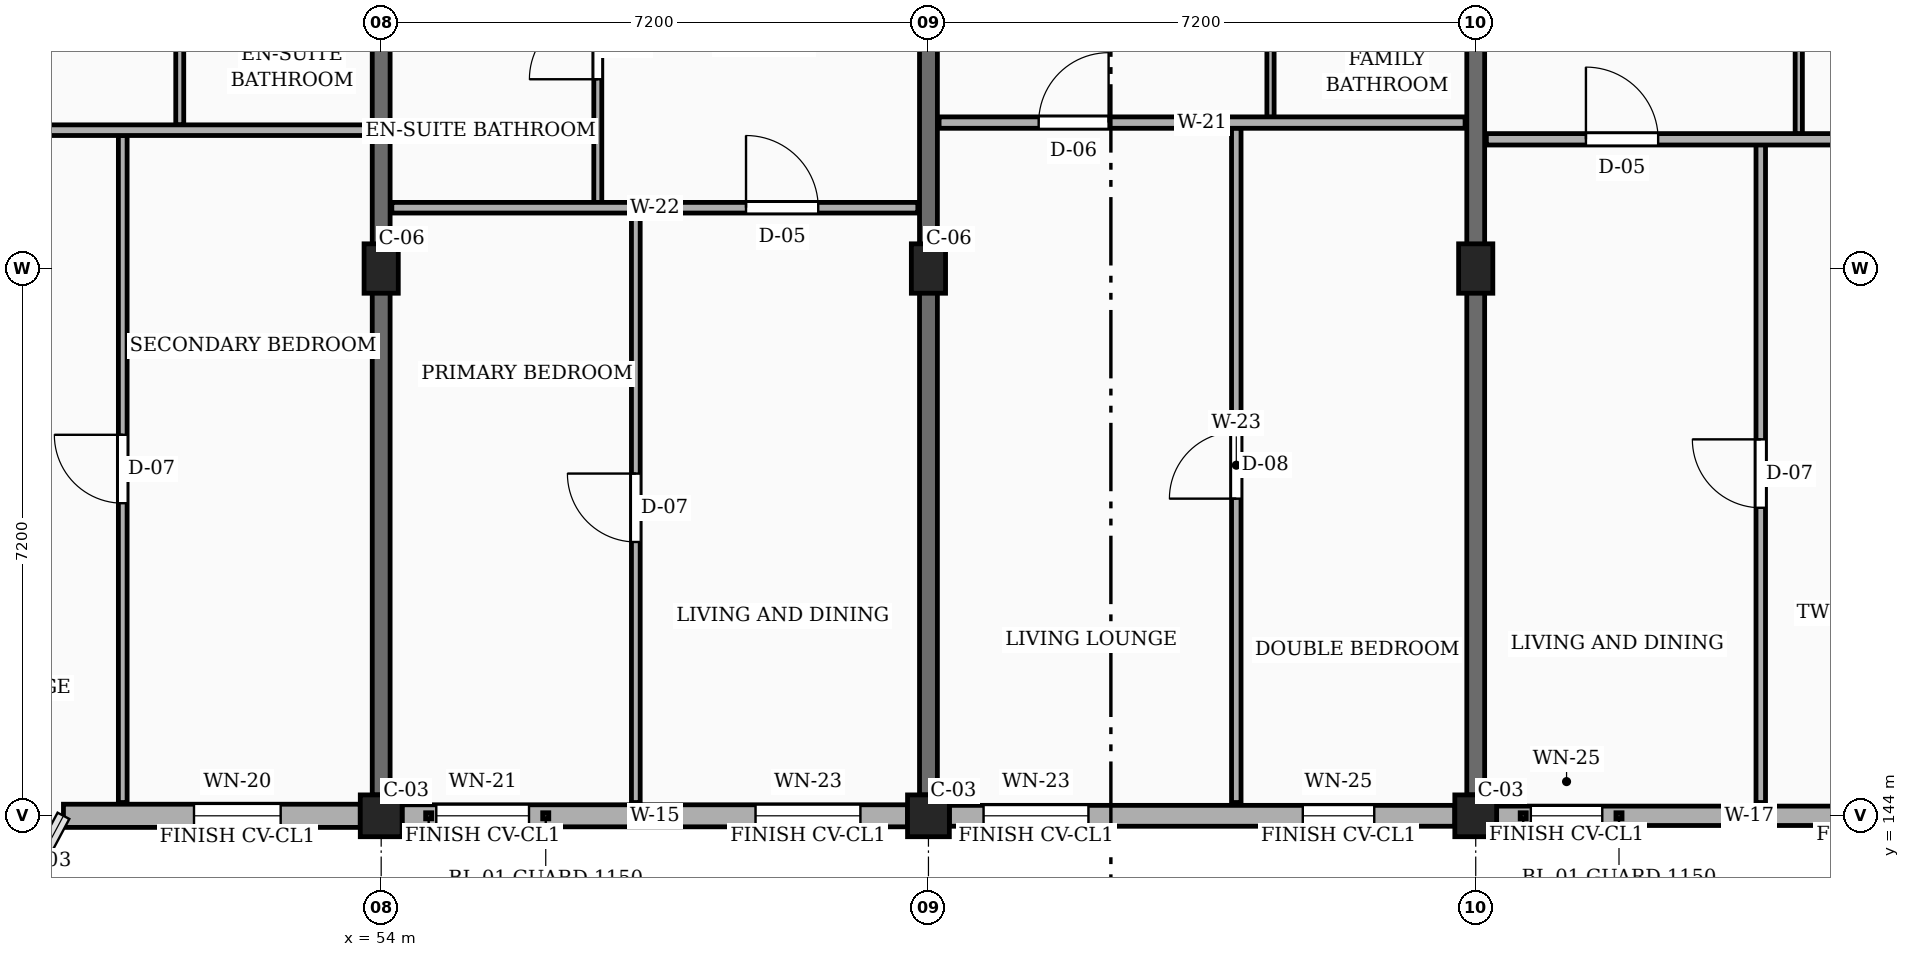
"""IFC4 building model, lengths in metres.
Left out: names, types, materials, properties, quantities, classifications, styles, units other than length and angle.
Written with IfcOpenShell. Run it as: python <this file> out.ifc"""

import sys

from ifc_helpers import new_model, si_unit, direction, frame, frame_2d, origin, origin_2d, place, context, subcontext, project, spatial, rectangle, extrude, element, fill, save


model = new_model("IFC4")
c1 = context("Model", 3, precision=1e-05, world=origin(), true_north=direction((0.0, 1.0)))
c2 = subcontext(c1, "Body", "Model", "MODEL_VIEW")
j1 = project(units=[si_unit("LENGTHUNIT", "METRE"), si_unit("PLANEANGLEUNIT", "RADIAN")], contexts=[c1])
p1 = place(None, origin())
s1 = spatial("IfcSite", under=j1, at=p1, CompositionType="ELEMENT")
p2 = place(p1, origin())
s2 = spatial("IfcBuilding", under=s1, at=p2, CompositionType="ELEMENT")
p3 = place(p2, frame((0.0, 0.0, 13.95)))
s3 = spatial("IfcBuildingStorey", under=s2, at=p3, CompositionType="ELEMENT", Elevation=13.95)
p4 = place(p3, frame((54.0, 144.0, 0.0), z_axis=(0.0, 0.0, 1.0), x_axis=(1.0, 0.0, 0.0)))
e1 = element("IfcColumn", 1, at=p4, inside=s3, PredefinedType="COLUMN", context=c2, shape_type="SweptSolid", body=[
    extrude(rectangle(XDim=0.55, YDim=0.55, at=origin_2d()), origin(), (0.0, 0.0, 1.0), 3.15),
])
p5 = place(p3, frame((54.0, 151.2, 0.0), z_axis=(0.0, 0.0, 1.0), x_axis=(1.0, 0.0, 0.0)))
e2 = element("IfcColumn", 2, at=p5, inside=s3, PredefinedType="COLUMN", context=c2, shape_type="SweptSolid", body=[
    extrude(rectangle(XDim=0.45, YDim=0.65, at=origin_2d()), origin(), (0.0, 0.0, 1.0), 3.15),
])
p6 = place(p3, frame((61.2, 144.0, 0.0), z_axis=(0.0, 0.0, 1.0), x_axis=(1.0, 0.0, 0.0)))
e3 = element("IfcColumn", 3, at=p6, inside=s3, PredefinedType="COLUMN", context=c2, shape_type="SweptSolid", body=[
    extrude(rectangle(XDim=0.55, YDim=0.55, at=origin_2d()), origin(), (0.0, 0.0, 1.0), 3.15),
])
p7 = place(p3, frame((61.2, 151.2, 0.0), z_axis=(0.0, 0.0, 1.0), x_axis=(1.0, 0.0, 0.0)))
e4 = element("IfcColumn", 4, at=p7, inside=s3, PredefinedType="COLUMN", context=c2, shape_type="SweptSolid", body=[
    extrude(rectangle(XDim=0.45, YDim=0.65, at=origin_2d()), origin(), (0.0, 0.0, 1.0), 3.15),
])
p8 = place(p3, frame((68.4, 144.0, 0.0), z_axis=(0.0, 0.0, 1.0), x_axis=(1.0, 0.0, 0.0)))
e5 = element("IfcColumn", 5, at=p8, inside=s3, PredefinedType="COLUMN", context=c2, shape_type="SweptSolid", body=[
    extrude(rectangle(XDim=0.55, YDim=0.55, at=origin_2d()), origin(), (0.0, 0.0, 1.0), 3.15),
])
p9 = place(p3, frame((68.4, 151.2, 0.0), z_axis=(0.0, 0.0, 1.0), x_axis=(1.0, 0.0, 0.0)))
e6 = element("IfcColumn", 6, at=p9, inside=s3, PredefinedType="COLUMN", context=c2, shape_type="SweptSolid", body=[
    extrude(rectangle(XDim=0.45, YDim=0.65, at=origin_2d()), origin(), (0.0, 0.0, 1.0), 3.15),
])
for number, where, z_axis, x_axis in (
    (7, (54.0, 144.275, 0.0), (0.0, 0.0, 1.0), (0.0, 1.0, 0.0)),
    (8, (61.2, 144.275, 0.0), (0.0, 0.0, 1.0), (0.0, 1.0, 0.0)),
    (9, (68.4, 144.275, 0.0), (0.0, 0.0, 1.0), (0.0, 1.0, 0.0)),
):
    element("IfcWall", number, at=place(p3, frame(where, z_axis=z_axis, x_axis=x_axis)), inside=s3, PredefinedType="SOLIDWALL", context=c2, shape_type="SweptSolid", body=[
        extrude(rectangle(XDim=11.875, YDim=0.235, at=frame_2d((5.938, 0.0))), origin(), (0.0, 0.0, 1.0), 2.185),
    ])
p10 = place(p3, frame((49.82, 144.0, 0.0), z_axis=(0.0, 0.0, 1.0), x_axis=(1.0, 0.0, 0.0)))
e10 = element("IfcWall", 10, at=p10, inside=s3, PredefinedType="SOLIDWALL", context=c2, shape_type="SweptSolid", body=[
    extrude(rectangle(XDim=3.905, YDim=0.305, at=frame_2d((1.953, 0.0))), origin(), (0.0, 0.0, 1.0), 2.455),
])
p11 = place(p10, frame((1.718, 0.0, 0.78)))
e11 = element("IfcOpeningElement", 11, at=p11, cuts=e10, PredefinedType="OPENING", context=c2, shape_type="SweptSolid", body=[
    extrude(rectangle(XDim=1.14, YDim=1.36, at=frame_2d((0.57, 0.68))), frame((0.0, 0.163, 0.0), z_axis=(0.0, -1.0, 0.0), x_axis=(1.0, 0.0, 0.0)), (0.0, 0.0, 1.0), 0.325),
])
p12 = place(p3, frame((54.275, 144.0, 0.0), z_axis=(0.0, 0.0, 1.0), x_axis=(1.0, 0.0, 0.0)))
e12 = element("IfcWall", 12, at=p12, inside=s3, PredefinedType="SOLIDWALL", context=c2, shape_type="SweptSolid", body=[
    extrude(rectangle(XDim=6.65, YDim=0.29, at=frame_2d((3.325, 0.0))), origin(), (0.0, 0.0, 1.0), 2.455),
])
p13 = place(p12, frame((0.45, 0.0, 0.78)))
e13 = element("IfcOpeningElement", 13, at=p13, cuts=e12, PredefinedType="OPENING", context=c2, shape_type="SweptSolid", body=[
    extrude(rectangle(XDim=1.22, YDim=1.36, at=frame_2d((0.61, 0.68))), frame((0.0, 0.155, 0.0), z_axis=(0.0, -1.0, 0.0), x_axis=(1.0, 0.0, 0.0)), (0.0, 0.0, 1.0), 0.31),
])
p14 = place(p12, frame((4.65, 0.0, 0.78)))
e14 = element("IfcOpeningElement", 14, at=p14, cuts=e12, PredefinedType="OPENING", context=c2, shape_type="SweptSolid", body=[
    extrude(rectangle(XDim=1.38, YDim=1.36, at=frame_2d((0.69, 0.68))), frame((0.0, 0.155, 0.0), z_axis=(0.0, -1.0, 0.0), x_axis=(1.0, 0.0, 0.0)), (0.0, 0.0, 1.0), 0.31),
])
p15 = place(p3, frame((61.475, 144.0, 0.0), z_axis=(0.0, 0.0, 1.0), x_axis=(1.0, 0.0, 0.0)))
e15 = element("IfcWall", 15, at=p15, inside=s3, PredefinedType="SOLIDWALL", context=c2, shape_type="SweptSolid", body=[
    extrude(rectangle(XDim=6.65, YDim=0.275, at=frame_2d((3.325, 0.0))), origin(), (0.0, 0.0, 1.0), 2.455),
])
p16 = place(p15, frame((0.45, 0.0, 0.78)))
e16 = element("IfcOpeningElement", 16, at=p16, cuts=e15, PredefinedType="OPENING", context=c2, shape_type="SweptSolid", body=[
    extrude(rectangle(XDim=1.38, YDim=1.36, at=frame_2d((0.69, 0.68))), frame((0.0, 0.147, 0.0), z_axis=(0.0, -1.0, 0.0), x_axis=(1.0, 0.0, 0.0)), (0.0, 0.0, 1.0), 0.295),
])
p17 = place(p15, frame((4.65, 0.0, 0.78)))
e17 = element("IfcOpeningElement", 17, at=p17, cuts=e15, PredefinedType="OPENING", context=c2, shape_type="SweptSolid", body=[
    extrude(rectangle(XDim=0.94, YDim=1.44, at=frame_2d((0.47, 0.72))), frame((0.0, 0.147, 0.0), z_axis=(0.0, -1.0, 0.0), x_axis=(1.0, 0.0, 0.0)), (0.0, 0.0, 1.0), 0.295),
])
p18 = place(p3, frame((68.675, 144.0, 0.0), z_axis=(0.0, 0.0, 1.0), x_axis=(1.0, 0.0, 0.0)))
e18 = element("IfcWall", 18, at=p18, inside=s3, PredefinedType="SOLIDWALL", context=c2, shape_type="SweptSolid", body=[
    extrude(rectangle(XDim=6.65, YDim=0.255, at=frame_2d((3.325, 0.0))), origin(), (0.0, 0.0, 1.0), 2.455),
])
p19 = place(p18, frame((0.45, 0.0, 0.78)))
e19 = element("IfcOpeningElement", 19, at=p19, cuts=e18, PredefinedType="OPENING", context=c2, shape_type="SweptSolid", body=[
    extrude(rectangle(XDim=0.94, YDim=1.44, at=frame_2d((0.47, 0.72))), frame((0.0, 0.137, 0.0), z_axis=(0.0, -1.0, 0.0), x_axis=(1.0, 0.0, 0.0)), (0.0, 0.0, 1.0), 0.275),
])
p20 = place(p18, frame((4.65, 0.0, 0.78)))
e20 = element("IfcOpeningElement", 20, at=p20, cuts=e18, PredefinedType="OPENING", context=c2, shape_type="SweptSolid", body=[
    extrude(rectangle(XDim=1.15, YDim=1.44, at=frame_2d((0.575, 0.72))), frame((0.0, 0.137, 0.0), z_axis=(0.0, -1.0, 0.0), x_axis=(1.0, 0.0, 0.0)), (0.0, 0.0, 1.0), 0.275),
])
p21 = place(p3, frame((50.6, 144.175, 0.0), z_axis=(0.0, 0.0, 1.0), x_axis=(0.0, 1.0, 0.0)))
e21 = element("IfcWall", 21, at=p21, inside=s3, PredefinedType="PARTITIONING", context=c2, shape_type="SweptSolid", body=[
    extrude(rectangle(XDim=8.775, YDim=0.115, at=frame_2d((4.387, 0.0))), origin(), (0.0, 0.0, 1.0), 2.32),
])
p22 = place(p21, frame((3.938, 0.0, 0.0)))
e22 = element("IfcOpeningElement", 22, at=p22, cuts=e21, PredefinedType="OPENING", context=c2, shape_type="SweptSolid", body=[
    extrude(rectangle(XDim=0.9, YDim=2.1, at=frame_2d((0.45, 1.05))), frame((0.0, 0.067, 0.0), z_axis=(0.0, -1.0, 0.0), x_axis=(1.0, 0.0, 0.0)), (0.0, 0.0, 1.0), 0.135),
])
p23 = place(p3, frame((51.35, 153.09, 0.0), z_axis=(0.0, 0.0, 1.0), x_axis=(0.0, 1.0, 0.0)))
e23 = element("IfcWall", 23, at=p23, inside=s3, PredefinedType="PARTITIONING", context=c2, shape_type="SweptSolid", body=[
    extrude(rectangle(XDim=3.12, YDim=0.105, at=frame_2d((1.56, 0.0))), origin(), (0.0, 0.0, 1.0), 2.32),
])
p24 = place(p23, frame((1.11, 0.0, 0.0)))
e24 = element("IfcOpeningElement", 24, at=p24, cuts=e23, PredefinedType="OPENING", context=c2, shape_type="SweptSolid", body=[
    extrude(rectangle(XDim=0.9, YDim=2.05, at=frame_2d((0.45, 1.025))), frame((0.0, 0.062, 0.0), z_axis=(0.0, -1.0, 0.0), x_axis=(1.0, 0.0, 0.0)), (0.0, 0.0, 1.0), 0.125),
])
p25 = place(p3, frame((46.94, 153.02, 0.0), z_axis=(0.0, 0.0, 1.0), x_axis=(1.0, 0.0, 0.0)))
e25 = element("IfcWall", 25, at=p25, inside=s3, PredefinedType="PARTITIONING", context=c2, shape_type="SweptSolid", body=[
    extrude(rectangle(XDim=6.92, YDim=0.14, at=frame_2d((3.46, 0.0))), origin(), (0.0, 0.0, 1.0), 2.32),
])
p26 = place(p25, frame((1.31, 0.0, 0.0)))
e26 = element("IfcOpeningElement", 26, at=p26, cuts=e25, PredefinedType="OPENING", context=c2, shape_type="SweptSolid", body=[
    extrude(rectangle(XDim=0.95, YDim=2.1, at=frame_2d((0.475, 1.05))), frame((0.0, 0.08, 0.0), z_axis=(0.0, -1.0, 0.0), x_axis=(1.0, 0.0, 0.0)), (0.0, 0.0, 1.0), 0.16),
])
p27 = place(p3, frame((57.35, 144.175, 0.0), z_axis=(0.0, 0.0, 1.0), x_axis=(0.0, 1.0, 0.0)))
e27 = element("IfcWall", 27, at=p27, inside=s3, PredefinedType="PARTITIONING", context=c2, shape_type="SweptSolid", body=[
    extrude(rectangle(XDim=7.755, YDim=0.115, at=frame_2d((3.877, 0.0))), origin(), (0.0, 0.0, 1.0), 2.32),
])
p28 = place(p27, frame((3.427, 0.0, 0.0)))
e28 = element("IfcOpeningElement", 28, at=p28, cuts=e27, PredefinedType="OPENING", context=c2, shape_type="SweptSolid", body=[
    extrude(rectangle(XDim=0.9, YDim=2.1, at=frame_2d((0.45, 1.05))), frame((0.0, 0.067, 0.0), z_axis=(0.0, -1.0, 0.0), x_axis=(1.0, 0.0, 0.0)), (0.0, 0.0, 1.0), 0.135),
])
p29 = place(p3, frame((56.85, 152.07, 0.0), z_axis=(0.0, 0.0, 1.0), x_axis=(0.0, 1.0, 0.0)))
e29 = element("IfcWall", 29, at=p29, inside=s3, PredefinedType="PARTITIONING", context=c2, shape_type="SweptSolid", body=[
    extrude(rectangle(XDim=4.14, YDim=0.105, at=frame_2d((2.07, 0.0))), origin(), (0.0, 0.0, 1.0), 2.32),
])
p30 = place(p29, frame((1.62, 0.0, 0.0)))
e30 = element("IfcOpeningElement", 30, at=p30, cuts=e29, PredefinedType="OPENING", context=c2, shape_type="SweptSolid", body=[
    extrude(rectangle(XDim=0.9, YDim=2.05, at=frame_2d((0.45, 1.025))), frame((0.0, 0.062, 0.0), z_axis=(0.0, -1.0, 0.0), x_axis=(1.0, 0.0, 0.0)), (0.0, 0.0, 1.0), 0.125),
])
p31 = place(p3, frame((54.14, 152.0, 0.0), z_axis=(0.0, 0.0, 1.0), x_axis=(1.0, 0.0, 0.0)))
e31 = element("IfcWall", 31, at=p31, inside=s3, PredefinedType="PARTITIONING", context=c2, shape_type="SweptSolid", body=[
    extrude(rectangle(XDim=6.92, YDim=0.14, at=frame_2d((3.46, 0.0))), origin(), (0.0, 0.0, 1.0), 2.32),
])
p32 = place(p31, frame((4.66, 0.0, 0.0)))
e32 = element("IfcOpeningElement", 32, at=p32, cuts=e31, PredefinedType="OPENING", context=c2, shape_type="SweptSolid", body=[
    extrude(rectangle(XDim=0.95, YDim=2.1, at=frame_2d((0.475, 1.05))), frame((0.0, 0.08, 0.0), z_axis=(0.0, -1.0, 0.0), x_axis=(1.0, 0.0, 0.0)), (0.0, 0.0, 1.0), 0.16),
])
p33 = place(p3, frame((65.25, 144.175, 0.0), z_axis=(0.0, 0.0, 1.0), x_axis=(0.0, 1.0, 0.0)))
e33 = element("IfcWall", 33, at=p33, inside=s3, PredefinedType="PARTITIONING", context=c2, shape_type="SweptSolid", body=[
    extrude(rectangle(XDim=8.875, YDim=0.125, at=frame_2d((4.438, 0.0))), origin(), (0.0, 0.0, 1.0), 2.32),
])
p34 = place(p33, frame((3.998, 0.0, 0.0)))
e34 = element("IfcOpeningElement", 34, at=p34, cuts=e33, PredefinedType="OPENING", context=c2, shape_type="SweptSolid", body=[
    extrude(rectangle(XDim=0.88, YDim=2.08, at=frame_2d((0.44, 1.04))), frame((0.0, 0.073, 0.0), z_axis=(0.0, -1.0, 0.0), x_axis=(1.0, 0.0, 0.0)), (0.0, 0.0, 1.0), 0.145),
])
p35 = place(p3, frame((65.7, 153.19, 0.0), z_axis=(0.0, 0.0, 1.0), x_axis=(0.0, 1.0, 0.0)))
e35 = element("IfcWall", 35, at=p35, inside=s3, PredefinedType="PARTITIONING", context=c2, shape_type="SweptSolid", body=[
    extrude(rectangle(XDim=3.02, YDim=0.095, at=frame_2d((1.51, 0.0))), origin(), (0.0, 0.0, 1.0), 2.32),
])
p36 = place(p35, frame((1.075, 0.0, 0.0)))
e36 = element("IfcOpeningElement", 36, at=p36, cuts=e35, PredefinedType="OPENING", context=c2, shape_type="SweptSolid", body=[
    extrude(rectangle(XDim=0.87, YDim=2.05, at=frame_2d((0.435, 1.025))), frame((0.0, 0.058, 0.0), z_axis=(0.0, -1.0, 0.0), x_axis=(1.0, 0.0, 0.0)), (0.0, 0.0, 1.0), 0.115),
])
p37 = place(p3, frame((61.34, 153.12, 0.0), z_axis=(0.0, 0.0, 1.0), x_axis=(1.0, 0.0, 0.0)))
e37 = element("IfcWall", 37, at=p37, inside=s3, PredefinedType="PARTITIONING", context=c2, shape_type="SweptSolid", body=[
    extrude(rectangle(XDim=6.92, YDim=0.15, at=frame_2d((3.46, 0.0))), origin(), (0.0, 0.0, 1.0), 2.32),
])
p38 = place(p37, frame((1.31, 0.0, 0.0)))
e38 = element("IfcOpeningElement", 38, at=p38, cuts=e37, PredefinedType="OPENING", context=c2, shape_type="SweptSolid", body=[
    extrude(rectangle(XDim=0.92, YDim=2.1, at=frame_2d((0.46, 1.05))), frame((0.0, 0.085, 0.0), z_axis=(0.0, -1.0, 0.0), x_axis=(1.0, 0.0, 0.0)), (0.0, 0.0, 1.0), 0.17),
])
p39 = place(p3, frame((72.15, 144.175, 0.0), z_axis=(0.0, 0.0, 1.0), x_axis=(0.0, 1.0, 0.0)))
e39 = element("IfcWall", 39, at=p39, inside=s3, PredefinedType="PARTITIONING", context=c2, shape_type="SweptSolid", body=[
    extrude(rectangle(XDim=8.655, YDim=0.125, at=frame_2d((4.328, 0.0))), origin(), (0.0, 0.0, 1.0), 2.32),
])
p40 = place(p39, frame((3.877, 0.0, 0.0)))
e40 = element("IfcOpeningElement", 40, at=p40, cuts=e39, PredefinedType="OPENING", context=c2, shape_type="SweptSolid", body=[
    extrude(rectangle(XDim=0.9, YDim=2.1, at=frame_2d((0.45, 1.05))), frame((0.0, 0.073, 0.0), z_axis=(0.0, -1.0, 0.0), x_axis=(1.0, 0.0, 0.0)), (0.0, 0.0, 1.0), 0.145),
])
p41 = place(p3, frame((72.65, 152.97, 0.0), z_axis=(0.0, 0.0, 1.0), x_axis=(0.0, 1.0, 0.0)))
e41 = element("IfcWall", 41, at=p41, inside=s3, PredefinedType="PARTITIONING", context=c2, shape_type="SweptSolid", body=[
    extrude(rectangle(XDim=3.24, YDim=0.095, at=frame_2d((1.62, 0.0))), origin(), (0.0, 0.0, 1.0), 2.32),
])
p42 = place(p41, frame((1.17, 0.0, 0.0)))
e42 = element("IfcOpeningElement", 42, at=p42, cuts=e41, PredefinedType="OPENING", context=c2, shape_type="SweptSolid", body=[
    extrude(rectangle(XDim=0.9, YDim=2.05, at=frame_2d((0.45, 1.025))), frame((0.0, 0.058, 0.0), z_axis=(0.0, -1.0, 0.0), x_axis=(1.0, 0.0, 0.0)), (0.0, 0.0, 1.0), 0.115),
])
p43 = place(p3, frame((68.54, 152.9, 0.0), z_axis=(0.0, 0.0, 1.0), x_axis=(1.0, 0.0, 0.0)))
e43 = element("IfcWall", 43, at=p43, inside=s3, PredefinedType="PARTITIONING", context=c2, shape_type="SweptSolid", body=[
    extrude(rectangle(XDim=6.885, YDim=0.15, at=frame_2d((3.442, 0.0))), origin(), (0.0, 0.0, 1.0), 2.32),
])
p44 = place(p43, frame((1.31, 0.0, 0.0)))
e44 = element("IfcOpeningElement", 44, at=p44, cuts=e43, PredefinedType="OPENING", context=c2, shape_type="SweptSolid", body=[
    extrude(rectangle(XDim=0.95, YDim=2.1, at=frame_2d((0.475, 1.05))), frame((0.0, 0.085, 0.0), z_axis=(0.0, -1.0, 0.0), x_axis=(1.0, 0.0, 0.0)), (0.0, 0.0, 1.0), 0.17),
])
p45 = place(p11, origin())
e45 = element("IfcWindow", 45, at=p45, inside=s3, PartitioningType="SINGLE_PANEL", PredefinedType="WINDOW", context=c2, shape_type="SweptSolid", body=[
    extrude(rectangle(XDim=1.14, YDim=1.36, at=frame_2d((0.57, 0.68))), frame((0.0, 0.03, 0.0), z_axis=(0.0, -1.0, 0.0), x_axis=(1.0, 0.0, 0.0)), (0.0, 0.0, 1.0), 0.06),
])
fill(e11, e45)
p46 = place(p13, origin())
e46 = element("IfcWindow", 46, at=p46, inside=s3, PartitioningType="SINGLE_PANEL", PredefinedType="WINDOW", context=c2, shape_type="SweptSolid", body=[
    extrude(rectangle(XDim=1.22, YDim=1.36, at=frame_2d((0.61, 0.68))), frame((0.0, 0.03, 0.0), z_axis=(0.0, -1.0, 0.0), x_axis=(1.0, 0.0, 0.0)), (0.0, 0.0, 1.0), 0.06),
])
fill(e13, e46)
p47 = place(p14, origin())
e47 = element("IfcWindow", 47, at=p47, inside=s3, PartitioningType="SINGLE_PANEL", PredefinedType="WINDOW", context=c2, shape_type="SweptSolid", body=[
    extrude(rectangle(XDim=1.38, YDim=1.36, at=frame_2d((0.69, 0.68))), frame((0.0, 0.03, 0.0), z_axis=(0.0, -1.0, 0.0), x_axis=(1.0, 0.0, 0.0)), (0.0, 0.0, 1.0), 0.06),
])
fill(e14, e47)
p48 = place(p16, origin())
e48 = element("IfcWindow", 48, at=p48, inside=s3, PartitioningType="SINGLE_PANEL", PredefinedType="WINDOW", context=c2, shape_type="SweptSolid", body=[
    extrude(rectangle(XDim=1.38, YDim=1.36, at=frame_2d((0.69, 0.68))), frame((0.0, 0.03, 0.0), z_axis=(0.0, -1.0, 0.0), x_axis=(1.0, 0.0, 0.0)), (0.0, 0.0, 1.0), 0.06),
])
fill(e16, e48)
p49 = place(p17, origin())
e49 = element("IfcWindow", 49, at=p49, inside=s3, PartitioningType="SINGLE_PANEL", PredefinedType="WINDOW", context=c2, shape_type="SweptSolid", body=[
    extrude(rectangle(XDim=0.94, YDim=1.44, at=frame_2d((0.47, 0.72))), frame((0.0, 0.03, 0.0), z_axis=(0.0, -1.0, 0.0), x_axis=(1.0, 0.0, 0.0)), (0.0, 0.0, 1.0), 0.06),
])
fill(e17, e49)
p50 = place(p19, origin())
e50 = element("IfcWindow", 50, at=p50, inside=s3, PartitioningType="SINGLE_PANEL", PredefinedType="WINDOW", context=c2, shape_type="SweptSolid", body=[
    extrude(rectangle(XDim=0.94, YDim=1.44, at=frame_2d((0.47, 0.72))), frame((0.0, 0.03, 0.0), z_axis=(0.0, -1.0, 0.0), x_axis=(1.0, 0.0, 0.0)), (0.0, 0.0, 1.0), 0.06),
])
fill(e19, e50)
p51 = place(p22, origin())
e51 = element("IfcDoor", 51, at=p51, inside=s3, OperationType="SINGLE_SWING_RIGHT", PredefinedType="DOOR", context=c2, shape_type="SweptSolid", body=[
    extrude(rectangle(XDim=0.9, YDim=2.1, at=frame_2d((0.45, 1.05))), frame((0.0, 0.025, 0.0), z_axis=(0.0, -1.0, 0.0), x_axis=(1.0, 0.0, 0.0)), (0.0, 0.0, 1.0), 0.05),
])
fill(e22, e51)
p52 = place(p28, origin())
e52 = element("IfcDoor", 52, at=p52, inside=s3, OperationType="SINGLE_SWING_RIGHT", PredefinedType="DOOR", context=c2, shape_type="SweptSolid", body=[
    extrude(rectangle(XDim=0.9, YDim=2.1, at=frame_2d((0.45, 1.05))), frame((0.0, 0.025, 0.0), z_axis=(0.0, -1.0, 0.0), x_axis=(1.0, 0.0, 0.0)), (0.0, 0.0, 1.0), 0.05),
])
fill(e28, e52)
p53 = place(p30, origin())
e53 = element("IfcDoor", 53, at=p53, inside=s3, OperationType="SINGLE_SWING_LEFT", PredefinedType="DOOR", context=c2, shape_type="SweptSolid", body=[
    extrude(rectangle(XDim=0.9, YDim=2.05, at=frame_2d((0.45, 1.025))), frame((0.0, 0.025, 0.0), z_axis=(0.0, -1.0, 0.0), x_axis=(1.0, 0.0, 0.0)), (0.0, 0.0, 1.0), 0.05),
])
fill(e30, e53)
p54 = place(p32, origin())
e54 = element("IfcDoor", 54, at=p54, inside=s3, OperationType="SINGLE_SWING_LEFT", PredefinedType="DOOR", context=c2, shape_type="SweptSolid", body=[
    extrude(rectangle(XDim=0.95, YDim=2.1, at=frame_2d((0.475, 1.05))), frame((0.0, 0.025, 0.0), z_axis=(0.0, -1.0, 0.0), x_axis=(1.0, 0.0, 0.0)), (0.0, 0.0, 1.0), 0.05),
])
fill(e32, e54)
p55 = place(p34, origin())
e55 = element("IfcDoor", 55, at=p55, inside=s3, OperationType="SINGLE_SWING_LEFT", PredefinedType="DOOR", context=c2, shape_type="SweptSolid", body=[
    extrude(rectangle(XDim=0.88, YDim=2.08, at=frame_2d((0.44, 1.04))), frame((0.0, 0.025, 0.0), z_axis=(0.0, -1.0, 0.0), x_axis=(1.0, 0.0, 0.0)), (0.0, 0.0, 1.0), 0.05),
])
fill(e34, e55)
p56 = place(p38, origin())
e56 = element("IfcDoor", 56, at=p56, inside=s3, OperationType="SINGLE_SWING_RIGHT", PredefinedType="DOOR", context=c2, shape_type="SweptSolid", body=[
    extrude(rectangle(XDim=0.92, YDim=2.1, at=frame_2d((0.46, 1.05))), frame((0.0, 0.025, 0.0), z_axis=(0.0, -1.0, 0.0), x_axis=(1.0, 0.0, 0.0)), (0.0, 0.0, 1.0), 0.05),
])
fill(e38, e56)
p57 = place(p40, origin())
e57 = element("IfcDoor", 57, at=p57, inside=s3, OperationType="SINGLE_SWING_RIGHT", PredefinedType="DOOR", context=c2, shape_type="SweptSolid", body=[
    extrude(rectangle(XDim=0.9, YDim=2.1, at=frame_2d((0.45, 1.05))), frame((0.0, 0.025, 0.0), z_axis=(0.0, -1.0, 0.0), x_axis=(1.0, 0.0, 0.0)), (0.0, 0.0, 1.0), 0.05),
])
fill(e40, e57)
p58 = place(p44, origin())
e58 = element("IfcDoor", 58, at=p58, inside=s3, OperationType="SINGLE_SWING_LEFT", PredefinedType="DOOR", context=c2, shape_type="SweptSolid", body=[
    extrude(rectangle(XDim=0.95, YDim=2.1, at=frame_2d((0.475, 1.05))), frame((0.0, 0.025, 0.0), z_axis=(0.0, -1.0, 0.0), x_axis=(1.0, 0.0, 0.0)), (0.0, 0.0, 1.0), 0.05),
])
fill(e44, e58)
save(model, sys.argv[1])
